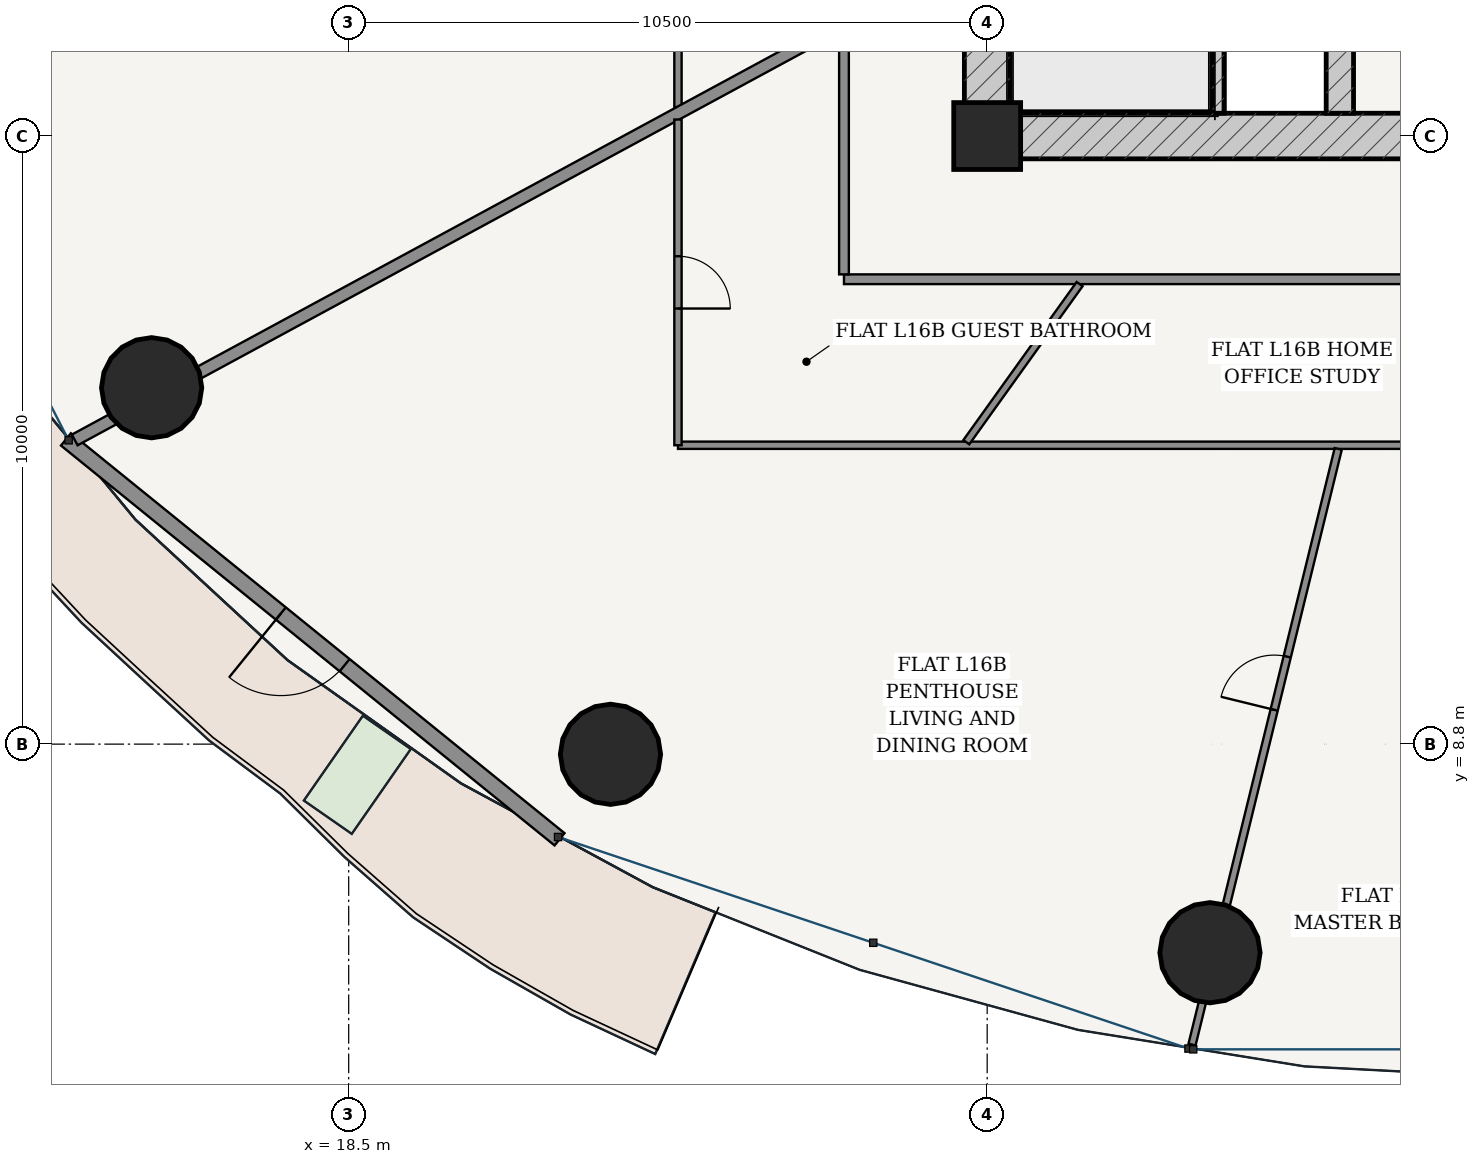
"""IFC4 building model, lengths in metres.
Left out: names, types, materials, properties, quantities, classifications, styles, units other than length and angle.
Written with IfcOpenShell. Run it as: python <this file> out.ifc"""

import sys

from ifc_helpers import new_model, si_unit, direction, frame, frame_2d, origin, origin_2d, place, context, subcontext, project, spatial, rectangle, hollow_circle, extrude, source, transform, mapped, element, fill, save


model = new_model("IFC4")
c1 = context("Model", 3, precision=1e-05, world=origin(), true_north=direction((-0.2419218956, 0.970295726276)))
c2 = subcontext(c1, "Body", "Model", "MODEL_VIEW")
j1 = project(units=[si_unit("LENGTHUNIT", "METRE"), si_unit("PLANEANGLEUNIT", "RADIAN")], contexts=[c1])
p1 = place(None, origin())
s1 = spatial("IfcSite", under=j1, at=p1, CompositionType="ELEMENT")
p2 = place(p1, origin())
s2 = spatial("IfcBuilding", under=s1, at=p2, CompositionType="ELEMENT")
p3 = place(p2, frame((0.0, 0.0, 63.6)))
s3 = spatial("IfcBuildingStorey", under=s2, at=p3, CompositionType="ELEMENT", Elevation=63.6)
p4 = place(p3, frame((29.0, 18.8, 0.0), z_axis=(0.0, 0.0, 1.0), x_axis=(1.0, 0.0, 0.0)))
e1 = element("IfcColumn", 1, at=p4, inside=s3, PredefinedType="COLUMN", context=c2, shape_type="SweptSolid", body=[
    extrude(rectangle(XDim=1.1, YDim=1.1, at=origin_2d()), origin(), (0.0, 0.0, 1.0), 3.6),
])
p5 = place(p3, frame((28.625, 18.8, 0.0), z_axis=(0.0, 0.0, 1.0), x_axis=(1.0, 0.0, 0.0)))
e2 = element("IfcWall", 2, at=p5, inside=s3, PredefinedType="SHEAR", context=c2, shape_type="SweptSolid", body=[
    extrude(rectangle(XDim=18.75, YDim=0.75, at=frame_2d((9.375, 0.0))), origin(), (0.0, 0.0, 1.0), 3.32),
])
p6 = place(p5, frame((8.95, 0.0, 0.0)))
e3 = element("IfcOpeningElement", 3, at=p6, cuts=e2, PredefinedType="OPENING", context=c2, shape_type="SweptSolid", body=[
    extrude(rectangle(XDim=0.85, YDim=2.1, at=frame_2d((0.425, 1.05))), frame((0.0, 0.385, 0.0), z_axis=(0.0, -1.0, 0.0), x_axis=(1.0, 0.0, 0.0)), (0.0, 0.0, 1.0), 0.77),
])
p7 = place(p3, frame((29.0, 19.175, 0.0), z_axis=(0.0, 0.0, 1.0), x_axis=(0.0, 1.0, 0.0)))
e4 = element("IfcWall", 4, at=p7, inside=s3, PredefinedType="SHEAR", context=c2, shape_type="SweptSolid", body=[
    extrude(rectangle(XDim=15.25, YDim=0.75, at=frame_2d((7.625, 0.0))), origin(), (0.0, 0.0, 1.0), 3.32),
])
p8 = place(p7, frame((9.875, 0.0, 0.0)))
e5 = element("IfcOpeningElement", 5, at=p8, cuts=e4, PredefinedType="OPENING", context=c2, shape_type="SweptSolid", body=[
    extrude(rectangle(XDim=1.5, YDim=2.2, at=frame_2d((0.75, 1.1))), frame((0.0, 0.385, 0.0), z_axis=(0.0, -1.0, 0.0), x_axis=(1.0, 0.0, 0.0)), (0.0, 0.0, 1.0), 0.77),
])
p9 = place(p3, frame((32.795, 19.175, 0.0), z_axis=(0.0, 0.0, 1.0), x_axis=(0.0, 1.0, 0.0)))
e6 = element("IfcWall", 6, at=p9, inside=s3, PredefinedType="SOLIDWALL", context=c2, shape_type="SweptSolid", body=[
    extrude(rectangle(XDim=7.375, YDim=0.2, at=frame_2d((3.688, 0.0))), origin(), (0.0, 0.0, 1.0), 3.32),
])
p10 = place(p3, frame((34.8, 19.175, 0.0), z_axis=(0.0, 0.0, 1.0), x_axis=(0.0, 1.0, 0.0)))
e7 = element("IfcWall", 7, at=p10, inside=s3, PredefinedType="SHEAR", context=c2, shape_type="SweptSolid", body=[
    extrude(rectangle(XDim=15.25, YDim=0.45, at=frame_2d((7.625, 0.0))), origin(), (0.0, 0.0, 1.0), 3.32),
])
p11 = place(p10, frame((7.8, 0.0, 0.0)))
e8 = element("IfcOpeningElement", 8, at=p11, cuts=e7, PredefinedType="OPENING", context=c2, shape_type="SweptSolid", body=[
    extrude(rectangle(XDim=1.05, YDim=2.15, at=frame_2d((0.525, 1.075))), frame((0.0, 0.235, 0.0), z_axis=(0.0, -1.0, 0.0), x_axis=(1.0, 0.0, 0.0)), (0.0, 0.0, 1.0), 0.47),
])
for number, where, z_axis, x_axis in (
    (9, (15.259, 14.661, 0.0), (0.0, 0.0, 1.0), (1.0, 0.0, 0.0)),
    (10, (22.805, 8.632, 0.0), (0.0, 0.0, 1.0), (1.0, 0.0, 0.0)),
    (11, (32.664, 5.37, 0.0), (0.0, 0.0, 1.0), (1.0, 0.0, 0.0)),
):
    element("IfcColumn", number, at=place(p3, frame(where, z_axis=z_axis, x_axis=x_axis)), inside=s3, PredefinedType="COLUMN", context=c2, shape_type="SweptSolid", body=[
        extrude(hollow_circle(Radius=0.825, WallThickness=0.05, at=origin_2d()), origin(), (0.0, 0.0, 1.0), 3.6),
    ])
p12 = place(p3, frame((13.85, 13.811, 0.0), z_axis=(0.0, 0.0, 1.0), x_axis=(0.777016782851, -0.629479879875, 0.0)))
e12 = element("IfcWall", 12, at=p12, inside=s3, PredefinedType="SOLIDWALL", context=c2, shape_type="SweptSolid", body=[
    extrude(rectangle(XDim=10.447, YDim=0.26, at=frame_2d((5.223, 0.0))), origin(), (0.0, 0.0, 1.0), 3.32),
])
p13 = place(p12, frame((4.548, 0.0, 0.0)))
e13 = element("IfcOpeningElement", 13, at=p13, cuts=e12, PredefinedType="OPENING", context=c2, shape_type="SweptSolid", body=[
    extrude(rectangle(XDim=1.35, YDim=2.2, at=frame_2d((0.675, 1.1))), frame((0.0, 0.14, 0.0), z_axis=(0.0, -1.0, 0.0), x_axis=(1.0, 0.0, 0.0)), (0.0, 0.0, 1.0), 0.28),
])
p14 = place(p3, frame((26.645, 16.445, 0.0), z_axis=(0.0, 0.0, 1.0), x_axis=(1.0, 0.0, 0.0)))
e14 = element("IfcWall", 14, at=p14, inside=s3, PredefinedType="PARTITIONING", context=c2, shape_type="SweptSolid", body=[
    extrude(rectangle(XDim=22.71, YDim=0.16, at=frame_2d((11.355, 0.0))), origin(), (0.0, 0.0, 1.0), 2.688),
])
p15 = place(p3, frame((26.645, 16.525, 0.0), z_axis=(0.0, 0.0, 1.0), x_axis=(0.0, 1.0, 0.0)))
e15 = element("IfcWall", 15, at=p15, inside=s3, PredefinedType="PARTITIONING", context=c2, shape_type="SweptSolid", body=[
    extrude(rectangle(XDim=20.55, YDim=0.16, at=frame_2d((10.275, 0.0))), origin(), (0.0, 0.0, 1.0), 2.688),
])
p16 = place(p15, frame((16.837, 0.0, 0.0)))
e16 = element("IfcOpeningElement", 16, at=p16, cuts=e15, PredefinedType="OPENING", context=c2, shape_type="SweptSolid", body=[
    extrude(rectangle(XDim=0.98, YDim=2.2, at=frame_2d((0.49, 1.1))), frame((0.0, 0.09, 0.0), z_axis=(0.0, -1.0, 0.0), x_axis=(1.0, 0.0, 0.0)), (0.0, 0.0, 1.0), 0.18),
])
p17 = place(p3, frame((23.915, 19.276, 0.0), z_axis=(0.0, 0.0, 1.0), x_axis=(0.0, 1.0, 0.0)))
e17 = element("IfcWall", 17, at=p17, inside=s3, PredefinedType="PARTITIONING", context=c2, shape_type="SweptSolid", body=[
    extrude(rectangle(XDim=20.609, YDim=0.12, at=frame_2d((10.305, 0.0))), origin(), (0.0, 0.0, 1.0), 2.688),
])
p18 = place(p17, frame((15.972, 0.0, 0.0)))
e18 = element("IfcOpeningElement", 18, at=p18, cuts=e17, PredefinedType="OPENING", context=c2, shape_type="SweptSolid", body=[
    extrude(rectangle(XDim=0.9, YDim=2.15, at=frame_2d((0.45, 1.075))), frame((0.0, 0.07, 0.0), z_axis=(0.0, -1.0, 0.0), x_axis=(1.0, 0.0, 0.0)), (0.0, 0.0, 1.0), 0.14),
])
p19 = place(p17, frame((3.058, 0.0, 0.0)))
e19 = element("IfcOpeningElement", 19, at=p19, cuts=e17, PredefinedType="OPENING", context=c2, shape_type="SweptSolid", body=[
    extrude(rectangle(XDim=0.9, YDim=2.15, at=frame_2d((0.45, 1.075))), frame((0.0, 0.07, 0.0), z_axis=(0.0, -1.0, 0.0), x_axis=(1.0, 0.0, 0.0)), (0.0, 0.0, 1.0), 0.14),
])
p20 = place(p3, frame((26.565, 20.608, 0.0), z_axis=(0.0, 0.0, 1.0), x_axis=(-0.879369737803, -0.476139542819, 0.0)))
e20 = element("IfcWall", 20, at=p20, inside=s3, PredefinedType="PARTITIONING", context=c2, shape_type="SweptSolid", body=[
    extrude(rectangle(XDim=14.295, YDim=0.2, at=frame_2d((7.147, 0.0))), origin(), (0.0, 0.0, 1.0), 2.688),
])
p21 = place(p3, frame((52.085, 13.715, 0.0), z_axis=(0.0, 0.0, 1.0), x_axis=(-1.0, 0.0, 0.0)))
e21 = element("IfcWall", 21, at=p21, inside=s3, PredefinedType="PARTITIONING", context=c2, shape_type="SweptSolid", body=[
    extrude(rectangle(XDim=28.17, YDim=0.12, at=frame_2d((14.085, 0.0))), origin(), (0.0, 0.0, 1.0), 2.688),
])
p22 = place(p21, frame((12.891, 0.0, 0.0)))
e22 = element("IfcOpeningElement", 22, at=p22, cuts=e21, PredefinedType="OPENING", context=c2, shape_type="SweptSolid", body=[
    extrude(rectangle(XDim=0.9, YDim=2.15, at=frame_2d((0.45, 1.075))), frame((0.0, 0.07, 0.0), z_axis=(0.0, -1.0, 0.0), x_axis=(1.0, 0.0, 0.0)), (0.0, 0.0, 1.0), 0.14),
])
p23 = place(p3, frame((23.915, 13.715, 0.0), z_axis=(0.0, 0.0, 1.0), x_axis=(0.0, 1.0, 0.0)))
e23 = element("IfcWall", 23, at=p23, inside=s3, PredefinedType="PARTITIONING", context=c2, shape_type="SweptSolid", body=[
    extrude(rectangle(XDim=5.356, YDim=0.12, at=frame_2d((2.678, 0.0))), origin(), (0.0, 0.0, 1.0), 2.999),
])
p24 = place(p23, frame((2.248, 0.0, 0.0)))
e24 = element("IfcOpeningElement", 24, at=p24, cuts=e23, PredefinedType="OPENING", context=c2, shape_type="SweptSolid", body=[
    extrude(rectangle(XDim=0.86, YDim=2.15, at=frame_2d((0.43, 1.075))), frame((0.0, 0.07, 0.0), z_axis=(0.0, -1.0, 0.0), x_axis=(1.0, 0.0, 0.0)), (0.0, 0.0, 1.0), 0.14),
])
p25 = place(p3, frame((34.773, 13.655, 0.0), z_axis=(0.0, 0.0, 1.0), x_axis=(-0.238375747469, -0.97117300365, 0.0)))
e25 = element("IfcWall", 25, at=p25, inside=s3, PredefinedType="PARTITIONING", context=c2, shape_type="SweptSolid", body=[
    extrude(rectangle(XDim=10.086, YDim=0.12, at=frame_2d((5.043, 0.0))), origin(), (0.0, 0.0, 1.0), 2.688),
])
p26 = place(p25, frame((3.518, 0.0, 0.0)))
e26 = element("IfcOpeningElement", 26, at=p26, cuts=e25, PredefinedType="OPENING", context=c2, shape_type="SweptSolid", body=[
    extrude(rectangle(XDim=0.9, YDim=2.15, at=frame_2d((0.45, 1.075))), frame((0.0, 0.07, 0.0), z_axis=(0.0, -1.0, 0.0), x_axis=(1.0, 0.0, 0.0)), (0.0, 0.0, 1.0), 0.14),
])
p27 = place(p3, frame((30.52, 16.365, 0.0), z_axis=(0.0, 0.0, 1.0), x_axis=(-0.582566008831, -0.812783393872, 0.0)))
e27 = element("IfcWall", 27, at=p27, inside=s3, PredefinedType="PARTITIONING", context=c2, shape_type="SweptSolid", body=[
    extrude(rectangle(XDim=3.198, YDim=0.12, at=frame_2d((1.599, 0.0))), origin(), (0.0, 0.0, 1.0), 3.32),
])
m1 = source(origin(), c2, "Body", "SweptSolid", [
    extrude(rectangle(XDim=1.35, YDim=2.2, at=frame_2d((0.675, 1.1))), frame((0.0, 0.025, 0.0), z_axis=(0.0, -1.0, 0.0), x_axis=(1.0, 0.0, 0.0)), (0.0, 0.0, 1.0), 0.05),
])
p28 = place(p13, frame((1.35, 0.0, 0.0), z_axis=(0.0, 0.0, 1.0), x_axis=(-1.0, 0.0, 0.0)))
e28 = element("IfcDoor", 28, at=p28, inside=s3, OperationType="SINGLE_SWING_RIGHT", PredefinedType="DOOR", context=c2, shape_type="MappedRepresentation", body=[
    mapped(m1, transform((0.0, 0.0, 0.0), scale=1.0)),
])
fill(e13, e28)
m2 = source(origin(), c2, "Body", "SweptSolid", [
    extrude(rectangle(XDim=0.9, YDim=2.15, at=frame_2d((0.45, 1.075))), frame((0.0, 0.025, 0.0), z_axis=(0.0, -1.0, 0.0), x_axis=(1.0, 0.0, 0.0)), (0.0, 0.0, 1.0), 0.05),
])
p29 = place(p26, frame((0.9, 0.0, 0.0), z_axis=(0.0, 0.0, 1.0), x_axis=(-1.0, 0.0, 0.0)))
e29 = element("IfcDoor", 29, at=p29, inside=s3, OperationType="SINGLE_SWING_LEFT", PredefinedType="DOOR", context=c2, shape_type="MappedRepresentation", body=[
    mapped(m2, transform((0.0, 0.0, 0.0), scale=1.0)),
])
fill(e26, e29)
m3 = source(origin(), c2, "Body", "SweptSolid", [
    extrude(rectangle(XDim=0.86, YDim=2.15, at=frame_2d((0.43, 1.075))), frame((0.0, 0.025, 0.0), z_axis=(0.0, -1.0, 0.0), x_axis=(1.0, 0.0, 0.0)), (0.0, 0.0, 1.0), 0.05),
])
p30 = place(p24, frame((0.86, 0.0, 0.0), z_axis=(0.0, 0.0, 1.0), x_axis=(-1.0, 0.0, 0.0)))
e30 = element("IfcDoor", 30, at=p30, inside=s3, OperationType="SINGLE_SWING_RIGHT", PredefinedType="DOOR", context=c2, shape_type="MappedRepresentation", body=[
    mapped(m3, transform((0.0, 0.0, 0.0), scale=1.0)),
])
fill(e24, e30)
save(model, sys.argv[1])
